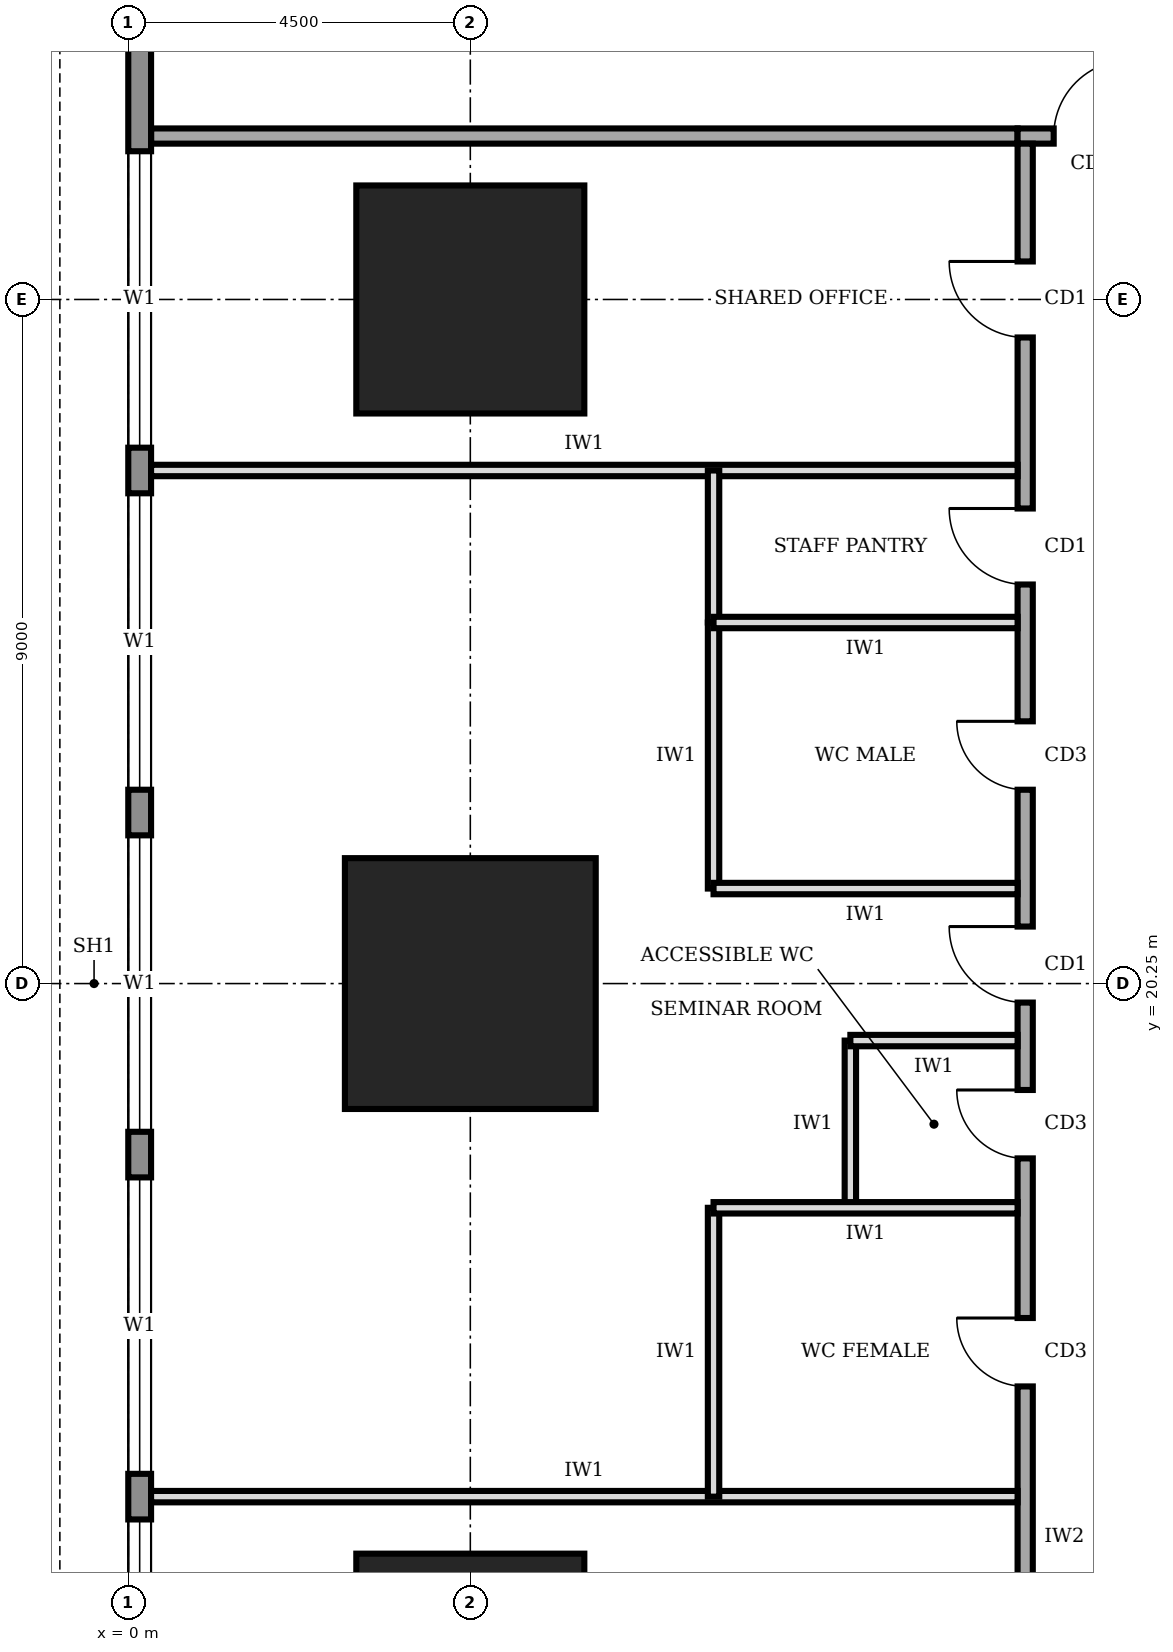
"""IFC4 building model, lengths in metres.
Left out: names, types, materials, properties, quantities, classifications, styles, units other than length and angle.
Written with IfcOpenShell. Run it as: python <this file> out.ifc"""

import sys

from ifc_helpers import new_model, si_unit, direction, frame, frame_2d, origin, origin_2d, place, context, subcontext, project, spatial, rectangle, extrude, element, fill, save


model = new_model("IFC4")
c1 = context("Model", 3, precision=1e-05, world=origin(), true_north=direction((0.0, 1.0)))
c2 = subcontext(c1, "Body", "Model", "MODEL_VIEW")
j1 = project(units=[si_unit("LENGTHUNIT", "METRE"), si_unit("PLANEANGLEUNIT", "RADIAN")], contexts=[c1])
p1 = place(None, origin())
s1 = spatial("IfcSite", under=j1, at=p1, CompositionType="ELEMENT")
p2 = place(p1, origin())
s2 = spatial("IfcBuilding", under=s1, at=p2, CompositionType="ELEMENT")
p3 = place(p2, frame((0.0, 0.0, 33.0)))
s3 = spatial("IfcBuildingStorey", under=s2, at=p3, CompositionType="ELEMENT", Elevation=33.0)
p4 = place(p3, frame((4.5, 11.25, 0.0), z_axis=(0.0, 0.0, 1.0), x_axis=(1.0, 0.0, 0.0)))
e1 = element("IfcColumn", 1, at=p4, inside=s3, PredefinedType="COLUMN", context=c2, shape_type="SweptSolid", body=[
    extrude(rectangle(XDim=3.0, YDim=3.0, at=origin_2d()), origin(), (0.0, 0.0, 1.0), 4.0),
])
p5 = place(p3, frame((4.5, 20.25, 0.0), z_axis=(0.0, 0.0, 1.0), x_axis=(1.0, 0.0, 0.0)))
e2 = element("IfcColumn", 2, at=p5, inside=s3, PredefinedType="COLUMN", context=c2, shape_type="SweptSolid", body=[
    extrude(rectangle(XDim=3.3, YDim=3.3, at=origin_2d()), origin(), (0.0, 0.0, 1.0), 4.0),
])
p6 = place(p3, frame((4.5, 29.25, 0.0), z_axis=(0.0, 0.0, 1.0), x_axis=(1.0, 0.0, 0.0)))
e3 = element("IfcColumn", 3, at=p6, inside=s3, PredefinedType="COLUMN", context=c2, shape_type="SweptSolid", body=[
    extrude(rectangle(XDim=3.0, YDim=3.0, at=origin_2d()), origin(), (0.0, 0.0, 1.0), 4.0),
])
p7 = place(p3, frame((0.15, 35.98, 0.0), z_axis=(0.0, 0.0, 1.0), x_axis=(0.0, -1.0, 0.0)))
e4 = element("IfcWall", 4, at=p7, inside=s3, PredefinedType="STANDARD", context=c2, shape_type="SweptSolid", body=[
    extrude(rectangle(XDim=31.46, YDim=0.3, at=frame_2d((15.73, 0.0))), origin(), (0.0, 0.0, 1.0), 3.75),
])
p8 = place(p7, frame((27.28, 0.0, 0.9)))
e5 = element("IfcOpeningElement", 5, at=p8, cuts=e4, PredefinedType="OPENING", context=c2, shape_type="SweptSolid", body=[
    extrude(rectangle(XDim=3.9, YDim=2.2, at=frame_2d((1.95, 1.1))), frame((0.0, 0.16, 0.0), z_axis=(0.0, -1.0, 0.0), x_axis=(1.0, 0.0, 0.0)), (0.0, 0.0, 1.0), 0.32),
])
p9 = place(p7, frame((22.78, 0.0, 0.9)))
e6 = element("IfcOpeningElement", 6, at=p9, cuts=e4, PredefinedType="OPENING", context=c2, shape_type="SweptSolid", body=[
    extrude(rectangle(XDim=3.9, YDim=2.2, at=frame_2d((1.95, 1.1))), frame((0.0, 0.16, 0.0), z_axis=(0.0, -1.0, 0.0), x_axis=(1.0, 0.0, 0.0)), (0.0, 0.0, 1.0), 0.32),
])
p10 = place(p7, frame((18.28, 0.0, 0.9)))
e7 = element("IfcOpeningElement", 7, at=p10, cuts=e4, PredefinedType="OPENING", context=c2, shape_type="SweptSolid", body=[
    extrude(rectangle(XDim=3.9, YDim=2.2, at=frame_2d((1.95, 1.1))), frame((0.0, 0.16, 0.0), z_axis=(0.0, -1.0, 0.0), x_axis=(1.0, 0.0, 0.0)), (0.0, 0.0, 1.0), 0.32),
])
p11 = place(p7, frame((13.78, 0.0, 0.9)))
e8 = element("IfcOpeningElement", 8, at=p11, cuts=e4, PredefinedType="OPENING", context=c2, shape_type="SweptSolid", body=[
    extrude(rectangle(XDim=3.9, YDim=2.2, at=frame_2d((1.95, 1.1))), frame((0.0, 0.16, 0.0), z_axis=(0.0, -1.0, 0.0), x_axis=(1.0, 0.0, 0.0)), (0.0, 0.0, 1.0), 0.32),
])
p12 = place(p7, frame((9.28, 0.0, 0.9)))
e9 = element("IfcOpeningElement", 9, at=p12, cuts=e4, PredefinedType="OPENING", context=c2, shape_type="SweptSolid", body=[
    extrude(rectangle(XDim=3.9, YDim=2.2, at=frame_2d((1.95, 1.1))), frame((0.0, 0.16, 0.0), z_axis=(0.0, -1.0, 0.0), x_axis=(1.0, 0.0, 0.0)), (0.0, 0.0, 1.0), 0.32),
])
p13 = place(p7, frame((4.78, 0.0, 0.9)))
e10 = element("IfcOpeningElement", 10, at=p13, cuts=e4, PredefinedType="OPENING", context=c2, shape_type="SweptSolid", body=[
    extrude(rectangle(XDim=3.9, YDim=2.2, at=frame_2d((1.95, 1.1))), frame((0.0, 0.16, 0.0), z_axis=(0.0, -1.0, 0.0), x_axis=(1.0, 0.0, 0.0)), (0.0, 0.0, 1.0), 0.32),
])
p14 = place(p3, frame((28.6, 31.4, 0.0), z_axis=(0.0, 0.0, 1.0), x_axis=(-1.0, 0.0, 0.0)))
e11 = element("IfcWall", 11, at=p14, inside=s3, PredefinedType="SOLIDWALL", context=c2, shape_type="SweptSolid", body=[
    extrude(rectangle(XDim=16.9, YDim=0.2, at=frame_2d((8.45, 0.0))), origin(), (0.0, 0.0, 1.0), 3.75),
])
p15 = place(p14, frame((15.425, 0.0, 0.0)))
e12 = element("IfcOpeningElement", 12, at=p15, cuts=e11, PredefinedType="OPENING", context=c2, shape_type="SweptSolid", body=[
    extrude(rectangle(XDim=1.0, YDim=2.1, at=frame_2d((0.5, 1.05))), frame((0.0, 0.11, 0.0), z_axis=(0.0, -1.0, 0.0), x_axis=(1.0, 0.0, 0.0)), (0.0, 0.0, 1.0), 0.22),
])
p16 = place(p14, frame((12.35, 0.0, 0.0)))
e13 = element("IfcOpeningElement", 13, at=p16, cuts=e11, PredefinedType="OPENING", context=c2, shape_type="SweptSolid", body=[
    extrude(rectangle(XDim=1.0, YDim=2.1, at=frame_2d((0.5, 1.05))), frame((0.0, 0.11, 0.0), z_axis=(0.0, -1.0, 0.0), x_axis=(1.0, 0.0, 0.0)), (0.0, 0.0, 1.0), 0.22),
])
p17 = place(p14, frame((5.6, 0.0, 0.0)))
e14 = element("IfcOpeningElement", 14, at=p17, cuts=e11, PredefinedType="OPENING", context=c2, shape_type="SweptSolid", body=[
    extrude(rectangle(XDim=1.0, YDim=2.1, at=frame_2d((0.5, 1.05))), frame((0.0, 0.11, 0.0), z_axis=(0.0, -1.0, 0.0), x_axis=(1.0, 0.0, 0.0)), (0.0, 0.0, 1.0), 0.22),
])
p18 = place(p14, frame((0.275, 0.0, 0.0)))
e15 = element("IfcOpeningElement", 15, at=p18, cuts=e11, PredefinedType="OPENING", context=c2, shape_type="SweptSolid", body=[
    extrude(rectangle(XDim=1.0, YDim=2.1, at=frame_2d((0.5, 1.05))), frame((0.0, 0.11, 0.0), z_axis=(0.0, -1.0, 0.0), x_axis=(1.0, 0.0, 0.0)), (0.0, 0.0, 1.0), 0.22),
])
p19 = place(p3, frame((11.8, 31.3, 0.0), z_axis=(0.0, 0.0, 1.0), x_axis=(0.0, -1.0, 0.0)))
e16 = element("IfcWall", 16, at=p19, inside=s3, PredefinedType="SOLIDWALL", context=c2, shape_type="SweptSolid", body=[
    extrude(rectangle(XDim=23.8, YDim=0.2, at=frame_2d((11.9, 0.0))), origin(), (0.0, 0.0, 1.0), 3.75),
])
p20 = place(p19, frame((20.3, 0.0, 0.0)))
e17 = element("IfcOpeningElement", 17, at=p20, cuts=e16, PredefinedType="OPENING", context=c2, shape_type="SweptSolid", body=[
    extrude(rectangle(XDim=1.0, YDim=2.1, at=frame_2d((0.5, 1.05))), frame((0.0, 0.11, 0.0), z_axis=(0.0, -1.0, 0.0), x_axis=(1.0, 0.0, 0.0)), (0.0, 0.0, 1.0), 0.22),
])
p21 = place(p19, frame((15.45, 0.0, 0.0)))
e18 = element("IfcOpeningElement", 18, at=p21, cuts=e16, PredefinedType="OPENING", context=c2, shape_type="SweptSolid", body=[
    extrude(rectangle(XDim=0.9, YDim=2.1, at=frame_2d((0.45, 1.05))), frame((0.0, 0.11, 0.0), z_axis=(0.0, -1.0, 0.0), x_axis=(1.0, 0.0, 0.0)), (0.0, 0.0, 1.0), 0.22),
])
p22 = place(p19, frame((12.45, 0.0, 0.0)))
e19 = element("IfcOpeningElement", 19, at=p22, cuts=e16, PredefinedType="OPENING", context=c2, shape_type="SweptSolid", body=[
    extrude(rectangle(XDim=0.9, YDim=2.1, at=frame_2d((0.45, 1.05))), frame((0.0, 0.11, 0.0), z_axis=(0.0, -1.0, 0.0), x_axis=(1.0, 0.0, 0.0)), (0.0, 0.0, 1.0), 0.22),
])
p23 = place(p19, frame((7.6, 0.0, 0.0)))
e20 = element("IfcOpeningElement", 20, at=p23, cuts=e16, PredefinedType="OPENING", context=c2, shape_type="SweptSolid", body=[
    extrude(rectangle(XDim=0.9, YDim=2.1, at=frame_2d((0.45, 1.05))), frame((0.0, 0.11, 0.0), z_axis=(0.0, -1.0, 0.0), x_axis=(1.0, 0.0, 0.0)), (0.0, 0.0, 1.0), 0.22),
])
p24 = place(p19, frame((4.8, 0.0, 0.0)))
e21 = element("IfcOpeningElement", 21, at=p24, cuts=e16, PredefinedType="OPENING", context=c2, shape_type="SweptSolid", body=[
    extrude(rectangle(XDim=1.0, YDim=2.1, at=frame_2d((0.5, 1.05))), frame((0.0, 0.11, 0.0), z_axis=(0.0, -1.0, 0.0), x_axis=(1.0, 0.0, 0.0)), (0.0, 0.0, 1.0), 0.22),
])
p25 = place(p19, frame((10.3, 0.0, 0.0)))
e22 = element("IfcOpeningElement", 22, at=p25, cuts=e16, PredefinedType="OPENING", context=c2, shape_type="SweptSolid", body=[
    extrude(rectangle(XDim=1.0, YDim=2.1, at=frame_2d((0.5, 1.05))), frame((0.0, 0.11, 0.0), z_axis=(0.0, -1.0, 0.0), x_axis=(1.0, 0.0, 0.0)), (0.0, 0.0, 1.0), 0.22),
])
p26 = place(p19, frame((1.55, 0.0, 0.0)))
e23 = element("IfcOpeningElement", 23, at=p26, cuts=e16, PredefinedType="OPENING", context=c2, shape_type="SweptSolid", body=[
    extrude(rectangle(XDim=1.0, YDim=2.1, at=frame_2d((0.5, 1.05))), frame((0.0, 0.11, 0.0), z_axis=(0.0, -1.0, 0.0), x_axis=(1.0, 0.0, 0.0)), (0.0, 0.0, 1.0), 0.22),
])
p27 = place(p3, frame((0.3, 31.4, 0.0), z_axis=(0.0, 0.0, 1.0), x_axis=(1.0, 0.0, 0.0)))
e24 = element("IfcWall", 24, at=p27, inside=s3, PredefinedType="SOLIDWALL", context=c2, shape_type="SweptSolid", body=[
    extrude(rectangle(XDim=11.4, YDim=0.2, at=frame_2d((5.7, 0.0))), origin(), (0.0, 0.0, 1.0), 3.75),
])
for number, where, z_axis, x_axis in (
    (25, (0.3, 13.5, 0.0), (0.0, 0.0, 1.0), (1.0, 0.0, 0.0)),
    (26, (0.3, 27.0, 0.0), (0.0, 0.0, 1.0), (1.0, 0.0, 0.0)),
):
    element("IfcWall", number, at=place(p3, frame(where, z_axis=z_axis, x_axis=x_axis)), inside=s3, PredefinedType="PARTITIONING", context=c2, shape_type="SweptSolid", body=[
        extrude(rectangle(XDim=11.4, YDim=0.15, at=frame_2d((5.7, 0.0))), origin(), (0.0, 0.0, 1.0), 3.75),
    ])
p28 = place(p3, frame((11.7, 17.3, 0.0), z_axis=(0.0, 0.0, 1.0), x_axis=(-1.0, 0.0, 0.0)))
e27 = element("IfcWall", 27, at=p28, inside=s3, PredefinedType="PARTITIONING", context=c2, shape_type="SweptSolid", body=[
    extrude(rectangle(XDim=4.0, YDim=0.15, at=frame_2d((2.0, 0.0))), origin(), (0.0, 0.0, 1.0), 3.75),
])
p29 = place(p3, frame((11.7, 19.5, 0.0), z_axis=(0.0, 0.0, 1.0), x_axis=(-1.0, 0.0, 0.0)))
e28 = element("IfcWall", 28, at=p29, inside=s3, PredefinedType="PARTITIONING", context=c2, shape_type="SweptSolid", body=[
    extrude(rectangle(XDim=2.2, YDim=0.15, at=frame_2d((1.1, 0.0))), origin(), (0.0, 0.0, 1.0), 2.85),
])
for number, where, z_axis, x_axis in (
    (29, (11.7, 21.5, 0.0), (0.0, 0.0, 1.0), (-1.0, 0.0, 0.0)),
    (30, (11.7, 25.0, 0.0), (0.0, 0.0, 1.0), (-1.0, 0.0, 0.0)),
):
    element("IfcWall", number, at=place(p3, frame(where, z_axis=z_axis, x_axis=x_axis)), inside=s3, PredefinedType="PARTITIONING", context=c2, shape_type="SweptSolid", body=[
        extrude(rectangle(XDim=4.0, YDim=0.15, at=frame_2d((2.0, 0.0))), origin(), (0.0, 0.0, 1.0), 3.75),
    ])
p30 = place(p3, frame((7.7, 13.5, 0.0), z_axis=(0.0, 0.0, 1.0), x_axis=(0.0, 1.0, 0.0)))
e31 = element("IfcWall", 31, at=p30, inside=s3, PredefinedType="PARTITIONING", context=c2, shape_type="SweptSolid", body=[
    extrude(rectangle(XDim=3.8, YDim=0.15, at=frame_2d((1.9, 0.0))), origin(), (0.0, 0.0, 1.0), 3.75),
])
p31 = place(p3, frame((9.5, 17.3, 0.0), z_axis=(0.0, 0.0, 1.0), x_axis=(0.0, 1.0, 0.0)))
e32 = element("IfcWall", 32, at=p31, inside=s3, PredefinedType="PARTITIONING", context=c2, shape_type="SweptSolid", body=[
    extrude(rectangle(XDim=2.2, YDim=0.15, at=frame_2d((1.1, 0.0))), origin(), (0.0, 0.0, 1.0), 3.75),
])
p32 = place(p3, frame((7.7, 21.5, 0.0), z_axis=(0.0, 0.0, 1.0), x_axis=(0.0, 1.0, 0.0)))
e33 = element("IfcWall", 33, at=p32, inside=s3, PredefinedType="PARTITIONING", context=c2, shape_type="SweptSolid", body=[
    extrude(rectangle(XDim=3.5, YDim=0.15, at=frame_2d((1.75, 0.0))), origin(), (0.0, 0.0, 1.0), 3.75),
])
p33 = place(p3, frame((7.7, 25.0, 0.0), z_axis=(0.0, 0.0, 1.0), x_axis=(0.0, 1.0, 0.0)))
e34 = element("IfcWall", 34, at=p33, inside=s3, PredefinedType="PARTITIONING", context=c2, shape_type="SweptSolid", body=[
    extrude(rectangle(XDim=2.0, YDim=0.15, at=frame_2d((1.0, 0.0))), origin(), (0.0, 0.0, 1.0), 3.75),
])
p34 = place(p9, origin())
e35 = element("IfcWindow", 35, at=p34, inside=s3, PartitioningType="SINGLE_PANEL", PredefinedType="WINDOW", context=c2, shape_type="SweptSolid", body=[
    extrude(rectangle(XDim=3.9, YDim=2.2, at=frame_2d((1.95, 1.1))), frame((0.0, 0.03, 0.0), z_axis=(0.0, -1.0, 0.0), x_axis=(1.0, 0.0, 0.0)), (0.0, 0.0, 1.0), 0.06),
])
fill(e6, e35)
p35 = place(p10, origin())
e36 = element("IfcWindow", 36, at=p35, inside=s3, PartitioningType="SINGLE_PANEL", PredefinedType="WINDOW", context=c2, shape_type="SweptSolid", body=[
    extrude(rectangle(XDim=3.9, YDim=2.2, at=frame_2d((1.95, 1.1))), frame((0.0, 0.03, 0.0), z_axis=(0.0, -1.0, 0.0), x_axis=(1.0, 0.0, 0.0)), (0.0, 0.0, 1.0), 0.06),
])
fill(e7, e36)
p36 = place(p11, origin())
e37 = element("IfcWindow", 37, at=p36, inside=s3, PartitioningType="SINGLE_PANEL", PredefinedType="WINDOW", context=c2, shape_type="SweptSolid", body=[
    extrude(rectangle(XDim=3.9, YDim=2.2, at=frame_2d((1.95, 1.1))), frame((0.0, 0.03, 0.0), z_axis=(0.0, -1.0, 0.0), x_axis=(1.0, 0.0, 0.0)), (0.0, 0.0, 1.0), 0.06),
])
fill(e8, e37)
p37 = place(p12, origin())
e38 = element("IfcWindow", 38, at=p37, inside=s3, PartitioningType="SINGLE_PANEL", PredefinedType="WINDOW", context=c2, shape_type="SweptSolid", body=[
    extrude(rectangle(XDim=3.9, YDim=2.2, at=frame_2d((1.95, 1.1))), frame((0.0, 0.03, 0.0), z_axis=(0.0, -1.0, 0.0), x_axis=(1.0, 0.0, 0.0)), (0.0, 0.0, 1.0), 0.06),
])
fill(e9, e38)
p38 = place(p13, origin())
e39 = element("IfcWindow", 39, at=p38, inside=s3, PartitioningType="SINGLE_PANEL", PredefinedType="WINDOW", context=c2, shape_type="SweptSolid", body=[
    extrude(rectangle(XDim=3.9, YDim=2.2, at=frame_2d((1.95, 1.1))), frame((0.0, 0.03, 0.0), z_axis=(0.0, -1.0, 0.0), x_axis=(1.0, 0.0, 0.0)), (0.0, 0.0, 1.0), 0.06),
])
fill(e10, e39)
p39 = place(p15, frame((1.0, 0.0, 0.0), z_axis=(0.0, 0.0, 1.0), x_axis=(-1.0, 0.0, 0.0)))
e40 = element("IfcDoor", 40, at=p39, inside=s3, OperationType="SINGLE_SWING_RIGHT", PredefinedType="DOOR", context=c2, shape_type="SweptSolid", body=[
    extrude(rectangle(XDim=1.0, YDim=2.1, at=frame_2d((0.5, 1.05))), frame((0.0, 0.025, 0.0), z_axis=(0.0, -1.0, 0.0), x_axis=(1.0, 0.0, 0.0)), (0.0, 0.0, 1.0), 0.05),
])
fill(e12, e40)
p40 = place(p21, frame((0.9, 0.0, 0.0), z_axis=(0.0, 0.0, 1.0), x_axis=(-1.0, 0.0, 0.0)))
e41 = element("IfcDoor", 41, at=p40, inside=s3, OperationType="SINGLE_SWING_RIGHT", PredefinedType="DOOR", context=c2, shape_type="SweptSolid", body=[
    extrude(rectangle(XDim=0.9, YDim=2.1, at=frame_2d((0.45, 1.05))), frame((0.0, 0.025, 0.0), z_axis=(0.0, -1.0, 0.0), x_axis=(1.0, 0.0, 0.0)), (0.0, 0.0, 1.0), 0.05),
])
fill(e18, e41)
p41 = place(p22, frame((0.9, 0.0, 0.0), z_axis=(0.0, 0.0, 1.0), x_axis=(-1.0, 0.0, 0.0)))
e42 = element("IfcDoor", 42, at=p41, inside=s3, OperationType="SINGLE_SWING_RIGHT", PredefinedType="DOOR", context=c2, shape_type="SweptSolid", body=[
    extrude(rectangle(XDim=0.9, YDim=2.1, at=frame_2d((0.45, 1.05))), frame((0.0, 0.025, 0.0), z_axis=(0.0, -1.0, 0.0), x_axis=(1.0, 0.0, 0.0)), (0.0, 0.0, 1.0), 0.05),
])
fill(e19, e42)
p42 = place(p23, frame((0.9, 0.0, 0.0), z_axis=(0.0, 0.0, 1.0), x_axis=(-1.0, 0.0, 0.0)))
e43 = element("IfcDoor", 43, at=p42, inside=s3, OperationType="SINGLE_SWING_RIGHT", PredefinedType="DOOR", context=c2, shape_type="SweptSolid", body=[
    extrude(rectangle(XDim=0.9, YDim=2.1, at=frame_2d((0.45, 1.05))), frame((0.0, 0.025, 0.0), z_axis=(0.0, -1.0, 0.0), x_axis=(1.0, 0.0, 0.0)), (0.0, 0.0, 1.0), 0.05),
])
fill(e20, e43)
p43 = place(p24, frame((1.0, 0.0, 0.0), z_axis=(0.0, 0.0, 1.0), x_axis=(-1.0, 0.0, 0.0)))
e44 = element("IfcDoor", 44, at=p43, inside=s3, OperationType="SINGLE_SWING_RIGHT", PredefinedType="DOOR", context=c2, shape_type="SweptSolid", body=[
    extrude(rectangle(XDim=1.0, YDim=2.1, at=frame_2d((0.5, 1.05))), frame((0.0, 0.025, 0.0), z_axis=(0.0, -1.0, 0.0), x_axis=(1.0, 0.0, 0.0)), (0.0, 0.0, 1.0), 0.05),
])
fill(e21, e44)
p44 = place(p25, frame((1.0, 0.0, 0.0), z_axis=(0.0, 0.0, 1.0), x_axis=(-1.0, 0.0, 0.0)))
e45 = element("IfcDoor", 45, at=p44, inside=s3, OperationType="SINGLE_SWING_RIGHT", PredefinedType="DOOR", context=c2, shape_type="SweptSolid", body=[
    extrude(rectangle(XDim=1.0, YDim=2.1, at=frame_2d((0.5, 1.05))), frame((0.0, 0.025, 0.0), z_axis=(0.0, -1.0, 0.0), x_axis=(1.0, 0.0, 0.0)), (0.0, 0.0, 1.0), 0.05),
])
fill(e22, e45)
p45 = place(p26, frame((1.0, 0.0, 0.0), z_axis=(0.0, 0.0, 1.0), x_axis=(-1.0, 0.0, 0.0)))
e46 = element("IfcDoor", 46, at=p45, inside=s3, OperationType="SINGLE_SWING_RIGHT", PredefinedType="DOOR", context=c2, shape_type="SweptSolid", body=[
    extrude(rectangle(XDim=1.0, YDim=2.1, at=frame_2d((0.5, 1.05))), frame((0.0, 0.025, 0.0), z_axis=(0.0, -1.0, 0.0), x_axis=(1.0, 0.0, 0.0)), (0.0, 0.0, 1.0), 0.05),
])
fill(e23, e46)
save(model, sys.argv[1])
